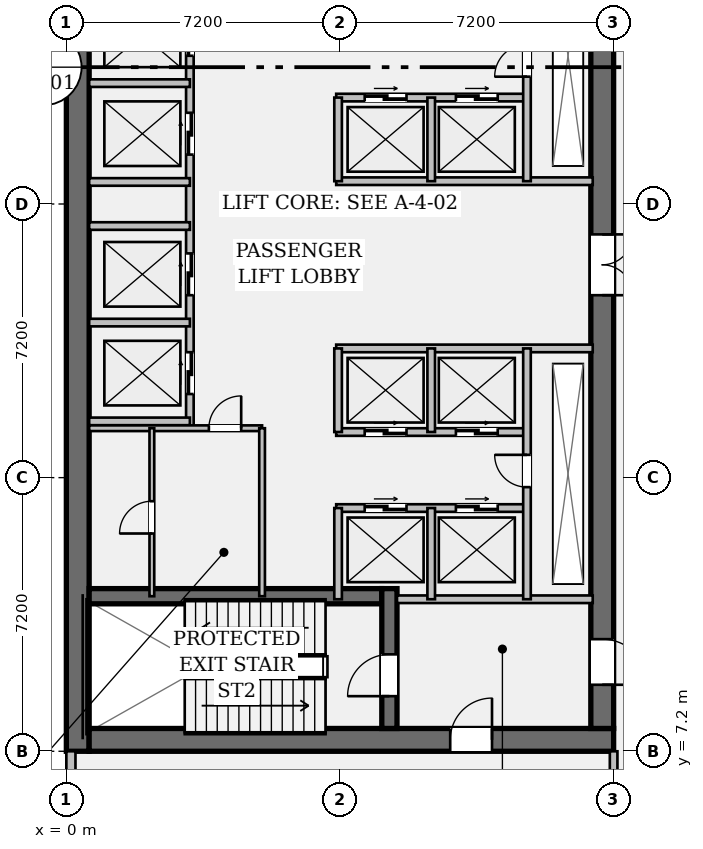
"""IFC4 building model, lengths in metres.
Left out: names, types, materials, properties, quantities, classifications, styles, units other than length and angle.
Written with IfcOpenShell. Run it as: python <this file> out.ifc"""

import sys

from ifc_helpers import new_model, si_unit, direction, frame, frame_2d, origin, place, context, subcontext, project, spatial, rectangle, extrude, element, fill, save


model = new_model("IFC4")
c1 = context("Model", 3, precision=1e-05, world=origin(), true_north=direction((0.0, 1.0)))
c2 = subcontext(c1, "Body", "Model", "MODEL_VIEW")
j1 = project(units=[si_unit("LENGTHUNIT", "METRE"), si_unit("PLANEANGLEUNIT", "RADIAN")], contexts=[c1])
p1 = place(None, origin())
s1 = spatial("IfcSite", under=j1, at=p1, CompositionType="ELEMENT")
p2 = place(p1, origin())
s2 = spatial("IfcBuilding", under=s1, at=p2, CompositionType="ELEMENT")
p3 = place(p2, origin())
s3 = spatial("IfcBuildingStorey", under=s2, at=p3, CompositionType="ELEMENT", Elevation=0.0)
p4 = place(p3, frame((0.3, 7.2, 0.0), z_axis=(0.0, 0.0, 1.0), x_axis=(0.0, 1.0, 0.0)))
e1 = element("IfcWall", 1, at=p4, inside=s3, PredefinedType="SHEAR", context=c2, shape_type="SweptSolid", body=[
    extrude(rectangle(XDim=28.8, YDim=0.6, at=frame_2d((14.4, 0.0))), origin(), (0.0, 0.0, 1.0), 4.95),
])
p5 = place(p3, frame((0.6, 7.5, 0.0), z_axis=(0.0, 0.0, 1.0), x_axis=(1.0, 0.0, 0.0)))
e2 = element("IfcWall", 2, at=p5, inside=s3, PredefinedType="SHEAR", context=c2, shape_type="SweptSolid", body=[
    extrude(rectangle(XDim=13.8, YDim=0.6, at=frame_2d((6.9, 0.0))), origin(), (0.0, 0.0, 1.0), 4.95),
])
p6 = place(p5, frame((9.5, 0.0, 0.0)))
e3 = element("IfcOpeningElement", 3, at=p6, cuts=e2, PredefinedType="OPENING", context=c2, shape_type="SweptSolid", body=[
    extrude(rectangle(XDim=1.1, YDim=2.15, at=frame_2d((0.55, 1.075))), frame((0.0, 0.312, 0.0), z_axis=(0.0, -1.0, 0.0), x_axis=(1.0, 0.0, 0.0)), (0.0, 0.0, 1.0), 0.624),
])
p7 = place(p3, frame((14.1, 35.4, 0.0), z_axis=(0.0, 0.0, 1.0), x_axis=(0.0, -1.0, 0.0)))
e4 = element("IfcWall", 4, at=p7, inside=s3, PredefinedType="SHEAR", context=c2, shape_type="SweptSolid", body=[
    extrude(rectangle(XDim=27.6, YDim=0.6, at=frame_2d((13.8, 0.0))), origin(), (0.0, 0.0, 1.0), 4.95),
])
p8 = place(p7, frame((1.3, 0.0, 0.0)))
e5 = element("IfcOpeningElement", 5, at=p8, cuts=e4, PredefinedType="OPENING", context=c2, shape_type="SweptSolid", body=[
    extrude(rectangle(XDim=1.2, YDim=2.15, at=frame_2d((0.6, 1.075))), frame((0.0, 0.312, 0.0), z_axis=(0.0, -1.0, 0.0), x_axis=(1.0, 0.0, 0.0)), (0.0, 0.0, 1.0), 0.624),
])
p9 = place(p7, frame((25.25, 0.0, 0.0)))
e6 = element("IfcOpeningElement", 6, at=p9, cuts=e4, PredefinedType="OPENING", context=c2, shape_type="SweptSolid", body=[
    extrude(rectangle(XDim=1.2, YDim=2.15, at=frame_2d((0.6, 1.075))), frame((0.0, 0.312, 0.0), z_axis=(0.0, -1.0, 0.0), x_axis=(1.0, 0.0, 0.0)), (0.0, 0.0, 1.0), 0.624),
])
p10 = place(p7, frame((14.6, 0.0, 0.0)))
e7 = element("IfcOpeningElement", 7, at=p10, cuts=e4, PredefinedType="OPENING", context=c2, shape_type="SweptSolid", body=[
    extrude(rectangle(XDim=1.6, YDim=2.2, at=frame_2d((0.8, 1.1))), frame((0.0, 0.312, 0.0), z_axis=(0.0, -1.0, 0.0), x_axis=(1.0, 0.0, 0.0)), (0.0, 0.0, 1.0), 0.624),
])
p11 = place(p3, frame((0.6, 11.28, 0.0), z_axis=(0.0, 0.0, 1.0), x_axis=(1.0, 0.0, 0.0)))
e8 = element("IfcWall", 8, at=p11, inside=s3, PredefinedType="SHEAR", context=c2, shape_type="SweptSolid", body=[
    extrude(rectangle(XDim=7.7, YDim=0.4, at=frame_2d((3.85, 0.0))), origin(), (0.0, 0.0, 1.0), 4.95),
])
p12 = place(p3, frame((8.5, 7.8, 0.0), z_axis=(0.0, 0.0, 1.0), x_axis=(0.0, 1.0, 0.0)))
e9 = element("IfcWall", 9, at=p12, inside=s3, PredefinedType="SHEAR", context=c2, shape_type="SweptSolid", body=[
    extrude(rectangle(XDim=3.68, YDim=0.4, at=frame_2d((1.84, 0.0))), origin(), (0.0, 0.0, 1.0), 4.95),
])
p13 = place(p12, frame((0.85, 0.0, 0.0)))
e10 = element("IfcOpeningElement", 10, at=p13, cuts=e9, PredefinedType="OPENING", context=c2, shape_type="SweptSolid", body=[
    extrude(rectangle(XDim=1.1, YDim=2.15, at=frame_2d((0.55, 1.075))), frame((0.0, 0.212, 0.0), z_axis=(0.0, -1.0, 0.0), x_axis=(1.0, 0.0, 0.0)), (0.0, 0.0, 1.0), 0.424),
])
p14 = place(p3, frame((0.12, 2.82, 0.0), z_axis=(0.0, 0.0, 1.0), x_axis=(0.0, 1.0, 0.0)))
e11 = element("IfcWall", 11, at=p14, inside=s3, PredefinedType="STANDARD", context=c2, shape_type="SweptSolid", body=[
    extrude(rectangle(XDim=4.38, YDim=0.24, at=frame_2d((2.19, 0.0))), origin(), (0.0, 0.0, 1.0), 4.95),
])
p15 = place(p3, frame((8.7, 11.2, 0.0), z_axis=(0.0, 0.0, 1.0), x_axis=(1.0, 0.0, 0.0)))
e12 = element("IfcWall", 12, at=p15, inside=s3, PredefinedType="PARTITIONING", context=c2, shape_type="SweptSolid", body=[
    extrude(rectangle(XDim=5.15, YDim=0.2, at=frame_2d((2.575, 0.0))), origin(), (0.0, 0.0, 1.0), 4.95),
])
p16 = place(p3, frame((3.25, 15.7, 0.0), z_axis=(0.0, 0.0, 1.0), x_axis=(0.0, 1.0, 0.0)))
e13 = element("IfcWall", 13, at=p16, inside=s3, PredefinedType="PARTITIONING", context=c2, shape_type="SweptSolid", body=[
    extrude(rectangle(XDim=13.08, YDim=0.2, at=frame_2d((6.54, 0.0))), origin(), (0.0, 0.0, 1.0), 4.95),
])
p17 = place(p16, frame((0.9, 0.0, 0.0)))
e14 = element("IfcOpeningElement", 14, at=p17, cuts=e13, PredefinedType="OPENING", context=c2, shape_type="SweptSolid", body=[
    extrude(rectangle(XDim=1.1, YDim=2.2, at=frame_2d((0.55, 1.1))), frame((0.0, 0.112, 0.0), z_axis=(0.0, -1.0, 0.0), x_axis=(1.0, 0.0, 0.0)), (0.0, 0.0, 1.0), 0.224),
])
p18 = place(p16, frame((3.5, 0.0, 0.0)))
e15 = element("IfcOpeningElement", 15, at=p18, cuts=e13, PredefinedType="OPENING", context=c2, shape_type="SweptSolid", body=[
    extrude(rectangle(XDim=1.1, YDim=2.2, at=frame_2d((0.55, 1.1))), frame((0.0, 0.112, 0.0), z_axis=(0.0, -1.0, 0.0), x_axis=(1.0, 0.0, 0.0)), (0.0, 0.0, 1.0), 0.224),
])
p19 = place(p16, frame((7.2, 0.0, 0.0)))
e16 = element("IfcOpeningElement", 16, at=p19, cuts=e13, PredefinedType="OPENING", context=c2, shape_type="SweptSolid", body=[
    extrude(rectangle(XDim=1.1, YDim=2.2, at=frame_2d((0.55, 1.1))), frame((0.0, 0.112, 0.0), z_axis=(0.0, -1.0, 0.0), x_axis=(1.0, 0.0, 0.0)), (0.0, 0.0, 1.0), 0.224),
])
p20 = place(p16, frame((9.8, 0.0, 0.0)))
e17 = element("IfcOpeningElement", 17, at=p20, cuts=e13, PredefinedType="OPENING", context=c2, shape_type="SweptSolid", body=[
    extrude(rectangle(XDim=1.1, YDim=2.2, at=frame_2d((0.55, 1.1))), frame((0.0, 0.112, 0.0), z_axis=(0.0, -1.0, 0.0), x_axis=(1.0, 0.0, 0.0)), (0.0, 0.0, 1.0), 0.224),
])
for number, where, z_axis, x_axis in (
    (18, (0.6, 15.88, 0.0), (0.0, 0.0, 1.0), (1.0, 0.0, 0.0)),
    (19, (0.6, 18.48, 0.0), (0.0, 0.0, 1.0), (1.0, 0.0, 0.0)),
    (20, (0.6, 22.18, 0.0), (0.0, 0.0, 1.0), (1.0, 0.0, 0.0)),
    (21, (0.6, 24.78, 0.0), (0.0, 0.0, 1.0), (1.0, 0.0, 0.0)),
    (22, (0.6, 21.02, 0.0), (0.0, 0.0, 1.0), (1.0, 0.0, 0.0)),
):
    element("IfcWall", number, at=place(p3, frame(where, z_axis=z_axis, x_axis=x_axis)), inside=s3, PredefinedType="PARTITIONING", context=c2, shape_type="SweptSolid", body=[
        extrude(rectangle(XDim=2.65, YDim=0.2, at=frame_2d((1.325, 0.0))), origin(), (0.0, 0.0, 1.0), 4.95),
    ])
p21 = place(p3, frame((7.1, 22.2, 0.0), z_axis=(0.0, 0.0, 1.0), x_axis=(1.0, 0.0, 0.0)))
e23 = element("IfcWall", 23, at=p21, inside=s3, PredefinedType="PARTITIONING", context=c2, shape_type="SweptSolid", body=[
    extrude(rectangle(XDim=6.75, YDim=0.2, at=frame_2d((3.375, 0.0))), origin(), (0.0, 0.0, 1.0), 4.95),
])
p22 = place(p3, frame((7.1, 24.4, 0.0), z_axis=(0.0, 0.0, 1.0), x_axis=(1.0, 0.0, 0.0)))
e24 = element("IfcWall", 24, at=p22, inside=s3, PredefinedType="PARTITIONING", context=c2, shape_type="SweptSolid", body=[
    extrude(rectangle(XDim=5.02, YDim=0.2, at=frame_2d((2.51, 0.0))), origin(), (0.0, 0.0, 1.0), 4.95),
])
p23 = place(p22, frame((0.75, 0.0, 0.0)))
e25 = element("IfcOpeningElement", 25, at=p23, cuts=e24, PredefinedType="OPENING", context=c2, shape_type="SweptSolid", body=[
    extrude(rectangle(XDim=1.1, YDim=2.2, at=frame_2d((0.55, 1.1))), frame((0.0, 0.112, 0.0), z_axis=(0.0, -1.0, 0.0), x_axis=(1.0, 0.0, 0.0)), (0.0, 0.0, 1.0), 0.224),
])
p24 = place(p22, frame((3.15, 0.0, 0.0)))
e26 = element("IfcOpeningElement", 26, at=p24, cuts=e24, PredefinedType="OPENING", context=c2, shape_type="SweptSolid", body=[
    extrude(rectangle(XDim=1.1, YDim=2.2, at=frame_2d((0.55, 1.1))), frame((0.0, 0.112, 0.0), z_axis=(0.0, -1.0, 0.0), x_axis=(1.0, 0.0, 0.0)), (0.0, 0.0, 1.0), 0.224),
])
for number, where, z_axis, x_axis in (
    (27, (7.15, 22.2, 0.0), (0.0, 0.0, 1.0), (0.0, 1.0, 0.0)),
    (28, (9.6, 22.2, 0.0), (0.0, 0.0, 1.0), (0.0, 1.0, 0.0)),
):
    element("IfcWall", number, at=place(p3, frame(where, z_axis=z_axis, x_axis=x_axis)), inside=s3, PredefinedType="PARTITIONING", context=c2, shape_type="SweptSolid", body=[
        extrude(rectangle(XDim=2.2, YDim=0.2, at=frame_2d((1.1, 0.0))), origin(), (0.0, 0.0, 1.0), 4.95),
    ])
p25 = place(p3, frame((12.12, 22.2, 0.0), z_axis=(0.0, 0.0, 1.0), x_axis=(0.0, 1.0, 0.0)))
e29 = element("IfcWall", 29, at=p25, inside=s3, PredefinedType="PARTITIONING", context=c2, shape_type="SweptSolid", body=[
    extrude(rectangle(XDim=6.58, YDim=0.2, at=frame_2d((3.29, 0.0))), origin(), (0.0, 0.0, 1.0), 4.95),
])
p26 = place(p25, frame((2.75, 0.0, 0.0)))
e30 = element("IfcOpeningElement", 30, at=p26, cuts=e29, PredefinedType="OPENING", context=c2, shape_type="SweptSolid", body=[
    extrude(rectangle(XDim=0.85, YDim=2.15, at=frame_2d((0.425, 1.075))), frame((0.0, 0.112, 0.0), z_axis=(0.0, -1.0, 0.0), x_axis=(1.0, 0.0, 0.0)), (0.0, 0.0, 1.0), 0.224),
])
p27 = place(p3, frame((7.1, 17.8, 0.0), z_axis=(0.0, 0.0, 1.0), x_axis=(1.0, 0.0, 0.0)))
e31 = element("IfcWall", 31, at=p27, inside=s3, PredefinedType="PARTITIONING", context=c2, shape_type="SweptSolid", body=[
    extrude(rectangle(XDim=6.75, YDim=0.2, at=frame_2d((3.375, 0.0))), origin(), (0.0, 0.0, 1.0), 4.95),
])
p28 = place(p3, frame((7.1, 15.6, 0.0), z_axis=(0.0, 0.0, 1.0), x_axis=(1.0, 0.0, 0.0)))
e32 = element("IfcWall", 32, at=p28, inside=s3, PredefinedType="PARTITIONING", context=c2, shape_type="SweptSolid", body=[
    extrude(rectangle(XDim=5.02, YDim=0.2, at=frame_2d((2.51, 0.0))), origin(), (0.0, 0.0, 1.0), 4.95),
])
p29 = place(p28, frame((0.75, 0.0, 0.0)))
e33 = element("IfcOpeningElement", 33, at=p29, cuts=e32, PredefinedType="OPENING", context=c2, shape_type="SweptSolid", body=[
    extrude(rectangle(XDim=1.1, YDim=2.2, at=frame_2d((0.55, 1.1))), frame((0.0, 0.112, 0.0), z_axis=(0.0, -1.0, 0.0), x_axis=(1.0, 0.0, 0.0)), (0.0, 0.0, 1.0), 0.224),
])
p30 = place(p28, frame((3.15, 0.0, 0.0)))
e34 = element("IfcOpeningElement", 34, at=p30, cuts=e32, PredefinedType="OPENING", context=c2, shape_type="SweptSolid", body=[
    extrude(rectangle(XDim=1.1, YDim=2.2, at=frame_2d((0.55, 1.1))), frame((0.0, 0.112, 0.0), z_axis=(0.0, -1.0, 0.0), x_axis=(1.0, 0.0, 0.0)), (0.0, 0.0, 1.0), 0.224),
])
p31 = place(p3, frame((7.1, 13.6, 0.0), z_axis=(0.0, 0.0, 1.0), x_axis=(1.0, 0.0, 0.0)))
e35 = element("IfcWall", 35, at=p31, inside=s3, PredefinedType="PARTITIONING", context=c2, shape_type="SweptSolid", body=[
    extrude(rectangle(XDim=5.02, YDim=0.2, at=frame_2d((2.51, 0.0))), origin(), (0.0, 0.0, 1.0), 4.95),
])
p32 = place(p31, frame((0.75, 0.0, 0.0)))
e36 = element("IfcOpeningElement", 36, at=p32, cuts=e35, PredefinedType="OPENING", context=c2, shape_type="SweptSolid", body=[
    extrude(rectangle(XDim=1.1, YDim=2.2, at=frame_2d((0.55, 1.1))), frame((0.0, 0.112, 0.0), z_axis=(0.0, -1.0, 0.0), x_axis=(1.0, 0.0, 0.0)), (0.0, 0.0, 1.0), 0.224),
])
p33 = place(p31, frame((3.15, 0.0, 0.0)))
e37 = element("IfcOpeningElement", 37, at=p33, cuts=e35, PredefinedType="OPENING", context=c2, shape_type="SweptSolid", body=[
    extrude(rectangle(XDim=1.1, YDim=2.2, at=frame_2d((0.55, 1.1))), frame((0.0, 0.112, 0.0), z_axis=(0.0, -1.0, 0.0), x_axis=(1.0, 0.0, 0.0)), (0.0, 0.0, 1.0), 0.224),
])
p34 = place(p3, frame((7.15, 15.6, 0.0), z_axis=(0.0, 0.0, 1.0), x_axis=(0.0, 1.0, 0.0)))
e38 = element("IfcWall", 38, at=p34, inside=s3, PredefinedType="PARTITIONING", context=c2, shape_type="SweptSolid", body=[
    extrude(rectangle(XDim=2.2, YDim=0.2, at=frame_2d((1.1, 0.0))), origin(), (0.0, 0.0, 1.0), 4.95),
])
p35 = place(p3, frame((7.15, 11.2, 0.0), z_axis=(0.0, 0.0, 1.0), x_axis=(0.0, 1.0, 0.0)))
e39 = element("IfcWall", 39, at=p35, inside=s3, PredefinedType="PARTITIONING", context=c2, shape_type="SweptSolid", body=[
    extrude(rectangle(XDim=2.4, YDim=0.2, at=frame_2d((1.2, 0.0))), origin(), (0.0, 0.0, 1.0), 4.95),
])
p36 = place(p3, frame((9.6, 15.6, 0.0), z_axis=(0.0, 0.0, 1.0), x_axis=(0.0, 1.0, 0.0)))
e40 = element("IfcWall", 40, at=p36, inside=s3, PredefinedType="PARTITIONING", context=c2, shape_type="SweptSolid", body=[
    extrude(rectangle(XDim=2.2, YDim=0.2, at=frame_2d((1.1, 0.0))), origin(), (0.0, 0.0, 1.0), 4.95),
])
p37 = place(p3, frame((9.6, 11.2, 0.0), z_axis=(0.0, 0.0, 1.0), x_axis=(0.0, 1.0, 0.0)))
e41 = element("IfcWall", 41, at=p37, inside=s3, PredefinedType="PARTITIONING", context=c2, shape_type="SweptSolid", body=[
    extrude(rectangle(XDim=2.4, YDim=0.2, at=frame_2d((1.2, 0.0))), origin(), (0.0, 0.0, 1.0), 4.95),
])
p38 = place(p3, frame((12.12, 11.2, 0.0), z_axis=(0.0, 0.0, 1.0), x_axis=(0.0, 1.0, 0.0)))
e42 = element("IfcWall", 42, at=p38, inside=s3, PredefinedType="PARTITIONING", context=c2, shape_type="SweptSolid", body=[
    extrude(rectangle(XDim=6.6, YDim=0.2, at=frame_2d((3.3, 0.0))), origin(), (0.0, 0.0, 1.0), 4.95),
])
p39 = place(p38, frame((2.95, 0.0, 0.0)))
e43 = element("IfcOpeningElement", 43, at=p39, cuts=e42, PredefinedType="OPENING", context=c2, shape_type="SweptSolid", body=[
    extrude(rectangle(XDim=0.85, YDim=2.15, at=frame_2d((0.425, 1.075))), frame((0.0, 0.112, 0.0), z_axis=(0.0, -1.0, 0.0), x_axis=(1.0, 0.0, 0.0)), (0.0, 0.0, 1.0), 0.224),
])
p40 = place(p3, frame((0.6, 15.7, 0.0), z_axis=(0.0, 0.0, 1.0), x_axis=(1.0, 0.0, 0.0)))
e44 = element("IfcWall", 44, at=p40, inside=s3, PredefinedType="PARTITIONING", context=c2, shape_type="SweptSolid", body=[
    extrude(rectangle(XDim=4.55, YDim=0.15, at=frame_2d((2.275, 0.0))), origin(), (0.0, 0.0, 1.0), 4.95),
])
p41 = place(p40, frame((3.15, 0.0, 0.0)))
e45 = element("IfcOpeningElement", 45, at=p41, cuts=e44, PredefinedType="OPENING", context=c2, shape_type="SweptSolid", body=[
    extrude(rectangle(XDim=0.85, YDim=2.15, at=frame_2d((0.425, 1.075))), frame((0.0, 0.087, 0.0), z_axis=(0.0, -1.0, 0.0), x_axis=(1.0, 0.0, 0.0)), (0.0, 0.0, 1.0), 0.174),
])
p42 = place(p3, frame((5.15, 11.28, 0.0), z_axis=(0.0, 0.0, 1.0), x_axis=(0.0, 1.0, 0.0)))
e46 = element("IfcWall", 46, at=p42, inside=s3, PredefinedType="PARTITIONING", context=c2, shape_type="SweptSolid", body=[
    extrude(rectangle(XDim=4.42, YDim=0.15, at=frame_2d((2.21, 0.0))), origin(), (0.0, 0.0, 1.0), 4.95),
])
p43 = place(p3, frame((2.25, 11.28, 0.0), z_axis=(0.0, 0.0, 1.0), x_axis=(0.0, 1.0, 0.0)))
e47 = element("IfcWall", 47, at=p43, inside=s3, PredefinedType="PARTITIONING", context=c2, shape_type="SweptSolid", body=[
    extrude(rectangle(XDim=4.42, YDim=0.125, at=frame_2d((2.21, 0.0))), origin(), (0.0, 0.0, 1.0), 4.95),
])
p44 = place(p43, frame((1.65, 0.0, 0.0)))
e48 = element("IfcOpeningElement", 48, at=p44, cuts=e47, PredefinedType="OPENING", context=c2, shape_type="SweptSolid", body=[
    extrude(rectangle(XDim=0.85, YDim=2.15, at=frame_2d((0.425, 1.075))), frame((0.0, 0.074, 0.0), z_axis=(0.0, -1.0, 0.0), x_axis=(1.0, 0.0, 0.0)), (0.0, 0.0, 1.0), 0.149),
])
p45 = place(p3, frame((14.4, 0.15, 0.0), z_axis=(0.0, 0.0, 1.0), x_axis=(0.0, 1.0, 0.0)))
e49 = element("IfcWall", 49, at=p45, inside=s3, PredefinedType="PARTITIONING", context=c2, shape_type="SweptSolid", body=[
    extrude(rectangle(XDim=7.05, YDim=0.2, at=frame_2d((3.525, 0.0))), origin(), (0.0, 0.0, 1.0), 3.988),
])
p46 = place(p13, origin())
e50 = element("IfcDoor", 50, at=p46, inside=s3, OperationType="SINGLE_SWING_LEFT", PredefinedType="DOOR", context=c2, shape_type="SweptSolid", body=[
    extrude(rectangle(XDim=1.1, YDim=2.15, at=frame_2d((0.55, 1.075))), frame((0.0, 0.025, 0.0), z_axis=(0.0, -1.0, 0.0), x_axis=(1.0, 0.0, 0.0)), (0.0, 0.0, 1.0), 0.05),
])
fill(e10, e50)
p47 = place(p9, origin())
e51 = element("IfcDoor", 51, at=p47, inside=s3, OperationType="SINGLE_SWING_RIGHT", PredefinedType="DOOR", context=c2, shape_type="SweptSolid", body=[
    extrude(rectangle(XDim=1.2, YDim=2.15, at=frame_2d((0.6, 1.075))), frame((0.0, 0.025, 0.0), z_axis=(0.0, -1.0, 0.0), x_axis=(1.0, 0.0, 0.0)), (0.0, 0.0, 1.0), 0.05),
])
fill(e6, e51)
p48 = place(p10, origin())
e52 = element("IfcDoor", 52, at=p48, inside=s3, OperationType="DOUBLE_DOOR_SINGLE_SWING", PredefinedType="DOOR", context=c2, shape_type="SweptSolid", body=[
    extrude(rectangle(XDim=1.6, YDim=2.2, at=frame_2d((0.8, 1.1))), frame((0.0, 0.025, 0.0), z_axis=(0.0, -1.0, 0.0), x_axis=(1.0, 0.0, 0.0)), (0.0, 0.0, 1.0), 0.05),
])
fill(e7, e52)
p49 = place(p17, origin())
e53 = element("IfcDoor", 53, at=p49, inside=s3, OperationType="DOUBLE_DOOR_SLIDING", PredefinedType="DOOR", context=c2, shape_type="SweptSolid", body=[
    extrude(rectangle(XDim=1.1, YDim=2.2, at=frame_2d((0.55, 1.1))), frame((0.0, 0.025, 0.0), z_axis=(0.0, -1.0, 0.0), x_axis=(1.0, 0.0, 0.0)), (0.0, 0.0, 1.0), 0.05),
])
fill(e14, e53)
p50 = place(p18, origin())
e54 = element("IfcDoor", 54, at=p50, inside=s3, OperationType="DOUBLE_DOOR_SLIDING", PredefinedType="DOOR", context=c2, shape_type="SweptSolid", body=[
    extrude(rectangle(XDim=1.1, YDim=2.2, at=frame_2d((0.55, 1.1))), frame((0.0, 0.025, 0.0), z_axis=(0.0, -1.0, 0.0), x_axis=(1.0, 0.0, 0.0)), (0.0, 0.0, 1.0), 0.05),
])
fill(e15, e54)
p51 = place(p19, origin())
e55 = element("IfcDoor", 55, at=p51, inside=s3, OperationType="DOUBLE_DOOR_SLIDING", PredefinedType="DOOR", context=c2, shape_type="SweptSolid", body=[
    extrude(rectangle(XDim=1.1, YDim=2.2, at=frame_2d((0.55, 1.1))), frame((0.0, 0.025, 0.0), z_axis=(0.0, -1.0, 0.0), x_axis=(1.0, 0.0, 0.0)), (0.0, 0.0, 1.0), 0.05),
])
fill(e16, e55)
p52 = place(p20, origin())
e56 = element("IfcDoor", 56, at=p52, inside=s3, OperationType="DOUBLE_DOOR_SLIDING", PredefinedType="DOOR", context=c2, shape_type="SweptSolid", body=[
    extrude(rectangle(XDim=1.1, YDim=2.2, at=frame_2d((0.55, 1.1))), frame((0.0, 0.025, 0.0), z_axis=(0.0, -1.0, 0.0), x_axis=(1.0, 0.0, 0.0)), (0.0, 0.0, 1.0), 0.05),
])
fill(e17, e56)
p53 = place(p26, origin())
e57 = element("IfcDoor", 57, at=p53, inside=s3, OperationType="SINGLE_SWING_LEFT", PredefinedType="DOOR", context=c2, shape_type="SweptSolid", body=[
    extrude(rectangle(XDim=0.85, YDim=2.15, at=frame_2d((0.425, 1.075))), frame((0.0, 0.025, 0.0), z_axis=(0.0, -1.0, 0.0), x_axis=(1.0, 0.0, 0.0)), (0.0, 0.0, 1.0), 0.05),
])
fill(e30, e57)
p54 = place(p23, origin())
e58 = element("IfcDoor", 58, at=p54, inside=s3, OperationType="DOUBLE_DOOR_SLIDING", PredefinedType="DOOR", context=c2, shape_type="SweptSolid", body=[
    extrude(rectangle(XDim=1.1, YDim=2.2, at=frame_2d((0.55, 1.1))), frame((0.0, 0.025, 0.0), z_axis=(0.0, -1.0, 0.0), x_axis=(1.0, 0.0, 0.0)), (0.0, 0.0, 1.0), 0.05),
])
fill(e25, e58)
p55 = place(p24, origin())
e59 = element("IfcDoor", 59, at=p55, inside=s3, OperationType="DOUBLE_DOOR_SLIDING", PredefinedType="DOOR", context=c2, shape_type="SweptSolid", body=[
    extrude(rectangle(XDim=1.1, YDim=2.2, at=frame_2d((0.55, 1.1))), frame((0.0, 0.025, 0.0), z_axis=(0.0, -1.0, 0.0), x_axis=(1.0, 0.0, 0.0)), (0.0, 0.0, 1.0), 0.05),
])
fill(e26, e59)
p56 = place(p39, origin())
e60 = element("IfcDoor", 60, at=p56, inside=s3, OperationType="SINGLE_SWING_RIGHT", PredefinedType="DOOR", context=c2, shape_type="SweptSolid", body=[
    extrude(rectangle(XDim=0.85, YDim=2.15, at=frame_2d((0.425, 1.075))), frame((0.0, 0.025, 0.0), z_axis=(0.0, -1.0, 0.0), x_axis=(1.0, 0.0, 0.0)), (0.0, 0.0, 1.0), 0.05),
])
fill(e43, e60)
p57 = place(p29, origin())
e61 = element("IfcDoor", 61, at=p57, inside=s3, OperationType="DOUBLE_DOOR_SLIDING", PredefinedType="DOOR", context=c2, shape_type="SweptSolid", body=[
    extrude(rectangle(XDim=1.1, YDim=2.2, at=frame_2d((0.55, 1.1))), frame((0.0, 0.025, 0.0), z_axis=(0.0, -1.0, 0.0), x_axis=(1.0, 0.0, 0.0)), (0.0, 0.0, 1.0), 0.05),
])
fill(e33, e61)
p58 = place(p30, origin())
e62 = element("IfcDoor", 62, at=p58, inside=s3, OperationType="DOUBLE_DOOR_SLIDING", PredefinedType="DOOR", context=c2, shape_type="SweptSolid", body=[
    extrude(rectangle(XDim=1.1, YDim=2.2, at=frame_2d((0.55, 1.1))), frame((0.0, 0.025, 0.0), z_axis=(0.0, -1.0, 0.0), x_axis=(1.0, 0.0, 0.0)), (0.0, 0.0, 1.0), 0.05),
])
fill(e34, e62)
p59 = place(p32, origin())
e63 = element("IfcDoor", 63, at=p59, inside=s3, OperationType="DOUBLE_DOOR_SLIDING", PredefinedType="DOOR", context=c2, shape_type="SweptSolid", body=[
    extrude(rectangle(XDim=1.1, YDim=2.2, at=frame_2d((0.55, 1.1))), frame((0.0, 0.025, 0.0), z_axis=(0.0, -1.0, 0.0), x_axis=(1.0, 0.0, 0.0)), (0.0, 0.0, 1.0), 0.05),
])
fill(e36, e63)
p60 = place(p33, origin())
e64 = element("IfcDoor", 64, at=p60, inside=s3, OperationType="DOUBLE_DOOR_SLIDING", PredefinedType="DOOR", context=c2, shape_type="SweptSolid", body=[
    extrude(rectangle(XDim=1.1, YDim=2.2, at=frame_2d((0.55, 1.1))), frame((0.0, 0.025, 0.0), z_axis=(0.0, -1.0, 0.0), x_axis=(1.0, 0.0, 0.0)), (0.0, 0.0, 1.0), 0.05),
])
fill(e37, e64)
p61 = place(p41, origin())
e65 = element("IfcDoor", 65, at=p61, inside=s3, OperationType="SINGLE_SWING_RIGHT", PredefinedType="DOOR", context=c2, shape_type="SweptSolid", body=[
    extrude(rectangle(XDim=0.85, YDim=2.15, at=frame_2d((0.425, 1.075))), frame((0.0, 0.025, 0.0), z_axis=(0.0, -1.0, 0.0), x_axis=(1.0, 0.0, 0.0)), (0.0, 0.0, 1.0), 0.05),
])
fill(e45, e65)
p62 = place(p44, origin())
e66 = element("IfcDoor", 66, at=p62, inside=s3, OperationType="SINGLE_SWING_LEFT", PredefinedType="DOOR", context=c2, shape_type="SweptSolid", body=[
    extrude(rectangle(XDim=0.85, YDim=2.15, at=frame_2d((0.425, 1.075))), frame((0.0, 0.025, 0.0), z_axis=(0.0, -1.0, 0.0), x_axis=(1.0, 0.0, 0.0)), (0.0, 0.0, 1.0), 0.05),
])
fill(e48, e66)
p63 = place(p6, origin())
e67 = element("IfcDoor", 67, at=p63, inside=s3, OperationType="SINGLE_SWING_RIGHT", PredefinedType="DOOR", context=c2, shape_type="SweptSolid", body=[
    extrude(rectangle(XDim=1.1, YDim=2.15, at=frame_2d((0.55, 1.075))), frame((0.0, 0.025, 0.0), z_axis=(0.0, -1.0, 0.0), x_axis=(1.0, 0.0, 0.0)), (0.0, 0.0, 1.0), 0.05),
])
fill(e3, e67)
save(model, sys.argv[1])
